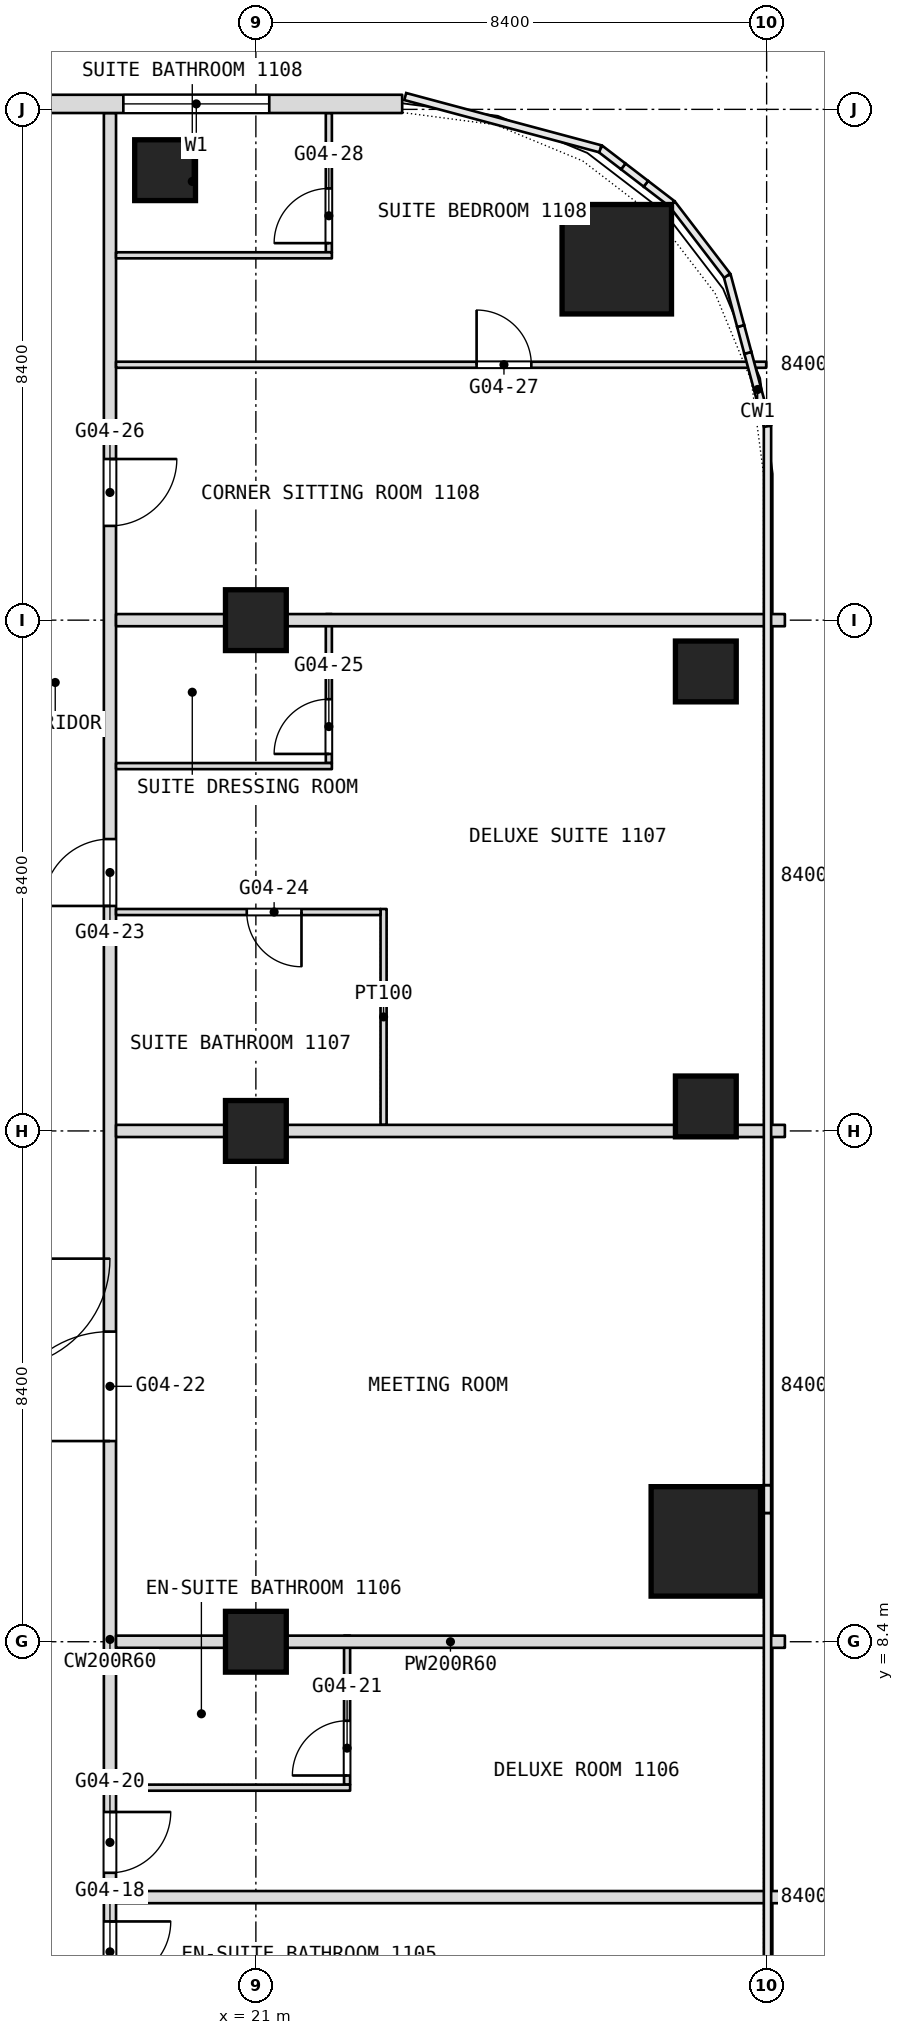
"""IFC4 building model, lengths in metres.
Left out: names, types, materials, properties, quantities, classifications, styles, units other than length and angle.
Written with IfcOpenShell. Run it as: python <this file> out.ifc"""

import sys

from ifc_helpers import new_model, si_unit, direction, frame, frame_2d, origin, origin_2d, place, context, subcontext, project, spatial, rectangle, extrude, element, fill, save


model = new_model("IFC4")
c1 = context("Model", 3, precision=1e-05, world=origin(), true_north=direction((0.0, 1.0)))
c2 = subcontext(c1, "Body", "Model", "MODEL_VIEW")
j1 = project(units=[si_unit("LENGTHUNIT", "METRE"), si_unit("PLANEANGLEUNIT", "RADIAN")], contexts=[c1])
p1 = place(None, origin())
s1 = spatial("IfcSite", under=j1, at=p1, CompositionType="ELEMENT")
p2 = place(p1, origin())
s2 = spatial("IfcBuilding", under=s1, at=p2, CompositionType="ELEMENT")
p3 = place(p2, frame((0.0, 0.0, 54.5)))
s3 = spatial("IfcBuildingStorey", under=s2, at=p3, CompositionType="ELEMENT", Elevation=54.5)
for number, where, z_axis, x_axis in (
    (1, (28.4, 10.05, 0.0), (0.0, 0.0, 1.0), (1.0, 0.0, 0.0)),
    (2, (26.936, 31.135, 0.0), (0.0, 0.0, 1.0), (1.0, 0.0, 0.0)),
):
    element("IfcColumn", number, at=place(p3, frame(where, z_axis=z_axis, x_axis=x_axis)), inside=s3, PredefinedType="COLUMN", context=c2, shape_type="SweptSolid", body=[
        extrude(rectangle(XDim=1.8, YDim=1.8, at=origin_2d()), origin(), (0.0, 0.0, 1.0), 3.6),
    ])
for number, where, z_axis, x_axis in (
    (3, (21.0, 8.4, 0.0), (0.0, 0.0, 1.0), (1.0, 0.0, 0.0)),
    (4, (21.0, 16.8, 0.0), (0.0, 0.0, 1.0), (1.0, 0.0, 0.0)),
    (5, (21.0, 25.2, 0.0), (0.0, 0.0, 1.0), (1.0, 0.0, 0.0)),
    (6, (19.507, 32.6, 0.0), (0.0, 0.0, 1.0), (1.0, 0.0, 0.0)),
    (7, (28.4, 24.356, 0.0), (0.0, 0.0, 1.0), (1.0, 0.0, 0.0)),
    (8, (28.4, 17.203, 0.0), (0.0, 0.0, 1.0), (1.0, 0.0, 0.0)),
):
    element("IfcColumn", number, at=place(p3, frame(where, z_axis=z_axis, x_axis=x_axis)), inside=s3, PredefinedType="COLUMN", context=c2, shape_type="SweptSolid", body=[
        extrude(rectangle(XDim=1.0, YDim=1.0, at=origin_2d()), origin(), (0.0, 0.0, 1.0), 3.6),
    ])
p4 = place(p3, frame((23.1, 16.9, 0.0), z_axis=(0.0, 0.0, 1.0), x_axis=(0.0, 1.0, 0.0)))
e9 = element("IfcWall", 9, at=p4, inside=s3, PredefinedType="PARTITIONING", context=c2, shape_type="SweptSolid", body=[
    extrude(rectangle(XDim=3.55, YDim=0.1, at=frame_2d((1.775, 0.0))), origin(), (0.0, 0.0, 1.0), 3.34),
])
p5 = place(p3, frame((22.5, 6.05, 0.0), z_axis=(0.0, 0.0, 1.0), x_axis=(0.0, 1.0, 0.0)))
e10 = element("IfcWall", 10, at=p5, inside=s3, PredefinedType="PARTITIONING", context=c2, shape_type="SweptSolid", body=[
    extrude(rectangle(XDim=2.45, YDim=0.1, at=frame_2d((1.225, 0.0))), origin(), (0.0, 0.0, 1.0), 3.34),
])
p6 = place(p5, frame((0.15, 0.0, 0.0)))
e11 = element("IfcOpeningElement", 11, at=p6, cuts=e10, PredefinedType="OPENING", context=c2, shape_type="SweptSolid", body=[
    extrude(rectangle(XDim=0.9, YDim=2.1, at=frame_2d((0.45, 1.05))), frame((0.0, 0.05, 0.0), z_axis=(0.0, -1.0, 0.0), x_axis=(1.0, 0.0, 0.0)), (0.0, 0.0, 1.0), 0.1),
])
p7 = place(p3, frame((22.2, 22.85, 0.0), z_axis=(0.0, 0.0, 1.0), x_axis=(0.0, 1.0, 0.0)))
e12 = element("IfcWall", 12, at=p7, inside=s3, PredefinedType="PARTITIONING", context=c2, shape_type="SweptSolid", body=[
    extrude(rectangle(XDim=2.45, YDim=0.1, at=frame_2d((1.225, 0.0))), origin(), (0.0, 0.0, 1.0), 3.34),
])
p8 = place(p7, frame((0.15, 0.0, 0.0)))
e13 = element("IfcOpeningElement", 13, at=p8, cuts=e12, PredefinedType="OPENING", context=c2, shape_type="SweptSolid", body=[
    extrude(rectangle(XDim=0.9, YDim=2.1, at=frame_2d((0.45, 1.05))), frame((0.0, 0.05, 0.0), z_axis=(0.0, -1.0, 0.0), x_axis=(1.0, 0.0, 0.0)), (0.0, 0.0, 1.0), 0.1),
])
p9 = place(p3, frame((22.2, 31.25, 0.0), z_axis=(0.0, 0.0, 1.0), x_axis=(0.0, 1.0, 0.0)))
e14 = element("IfcWall", 14, at=p9, inside=s3, PredefinedType="PARTITIONING", context=c2, shape_type="SweptSolid", body=[
    extrude(rectangle(XDim=2.29, YDim=0.1, at=frame_2d((1.145, 0.0))), origin(), (0.0, 0.0, 1.0), 3.34),
])
p10 = place(p9, frame((0.15, 0.0, 0.0)))
e15 = element("IfcOpeningElement", 15, at=p10, cuts=e14, PredefinedType="OPENING", context=c2, shape_type="SweptSolid", body=[
    extrude(rectangle(XDim=0.9, YDim=2.1, at=frame_2d((0.45, 1.05))), frame((0.0, 0.05, 0.0), z_axis=(0.0, -1.0, 0.0), x_axis=(1.0, 0.0, 0.0)), (0.0, 0.0, 1.0), 0.1),
])
p11 = place(p3, frame((18.6, -16.665, 0.0), z_axis=(0.0, 0.0, 1.0), x_axis=(0.0, 1.0, 0.0)))
e16 = element("IfcWall", 16, at=p11, inside=s3, PredefinedType="PARTITIONING", context=c2, shape_type="SweptSolid", body=[
    extrude(rectangle(XDim=50.205, YDim=0.2, at=frame_2d((25.103, 0.0))), origin(), (0.0, 0.0, 1.0), 3.34),
])
p12 = place(p11, frame((2.991, 0.0, 0.0)))
e17 = element("IfcOpeningElement", 17, at=p12, cuts=e16, PredefinedType="OPENING", context=c2, shape_type="SweptSolid", body=[
    extrude(rectangle(XDim=1.0, YDim=2.1, at=frame_2d((0.5, 1.05))), frame((0.0, 0.1, 0.0), z_axis=(0.0, -1.0, 0.0), x_axis=(1.0, 0.0, 0.0)), (0.0, 0.0, 1.0), 0.2),
])
p13 = place(p11, frame((4.574, 0.0, 0.0)))
e18 = element("IfcOpeningElement", 18, at=p13, cuts=e16, PredefinedType="OPENING", context=c2, shape_type="SweptSolid", body=[
    extrude(rectangle(XDim=1.0, YDim=2.1, at=frame_2d((0.5, 1.05))), frame((0.0, 0.1, 0.0), z_axis=(0.0, -1.0, 0.0), x_axis=(1.0, 0.0, 0.0)), (0.0, 0.0, 1.0), 0.2),
])
p14 = place(p11, frame((8.665, 0.0, 0.0)))
e19 = element("IfcOpeningElement", 19, at=p14, cuts=e16, PredefinedType="OPENING", context=c2, shape_type="SweptSolid", body=[
    extrude(rectangle(XDim=1.0, YDim=2.1, at=frame_2d((0.5, 1.05))), frame((0.0, 0.1, 0.0), z_axis=(0.0, -1.0, 0.0), x_axis=(1.0, 0.0, 0.0)), (0.0, 0.0, 1.0), 0.2),
])
p15 = place(p11, frame((15.265, 0.0, 0.0)))
e20 = element("IfcOpeningElement", 20, at=p15, cuts=e16, PredefinedType="OPENING", context=c2, shape_type="SweptSolid", body=[
    extrude(rectangle(XDim=1.0, YDim=2.1, at=frame_2d((0.5, 1.05))), frame((0.0, 0.1, 0.0), z_axis=(0.0, -1.0, 0.0), x_axis=(1.0, 0.0, 0.0)), (0.0, 0.0, 1.0), 0.2),
])
p16 = place(p11, frame((19.465, 0.0, 0.0)))
e21 = element("IfcOpeningElement", 21, at=p16, cuts=e16, PredefinedType="OPENING", context=c2, shape_type="SweptSolid", body=[
    extrude(rectangle(XDim=1.0, YDim=2.1, at=frame_2d((0.5, 1.05))), frame((0.0, 0.1, 0.0), z_axis=(0.0, -1.0, 0.0), x_axis=(1.0, 0.0, 0.0)), (0.0, 0.0, 1.0), 0.2),
])
p17 = place(p11, frame((21.265, 0.0, 0.0)))
e22 = element("IfcOpeningElement", 22, at=p17, cuts=e16, PredefinedType="OPENING", context=c2, shape_type="SweptSolid", body=[
    extrude(rectangle(XDim=1.0, YDim=2.1, at=frame_2d((0.5, 1.05))), frame((0.0, 0.1, 0.0), z_axis=(0.0, -1.0, 0.0), x_axis=(1.0, 0.0, 0.0)), (0.0, 0.0, 1.0), 0.2),
])
p18 = place(p11, frame((28.365, 0.0, 0.0)))
e23 = element("IfcOpeningElement", 23, at=p18, cuts=e16, PredefinedType="OPENING", context=c2, shape_type="SweptSolid", body=[
    extrude(rectangle(XDim=1.8, YDim=2.1, at=frame_2d((0.9, 1.05))), frame((0.0, 0.1, 0.0), z_axis=(0.0, -1.0, 0.0), x_axis=(1.0, 0.0, 0.0)), (0.0, 0.0, 1.0), 0.2),
])
p19 = place(p11, frame((37.165, 0.0, 0.0)))
e24 = element("IfcOpeningElement", 24, at=p19, cuts=e16, PredefinedType="OPENING", context=c2, shape_type="SweptSolid", body=[
    extrude(rectangle(XDim=1.1, YDim=2.1, at=frame_2d((0.55, 1.05))), frame((0.0, 0.1, 0.0), z_axis=(0.0, -1.0, 0.0), x_axis=(1.0, 0.0, 0.0)), (0.0, 0.0, 1.0), 0.2),
])
p20 = place(p11, frame((43.415, 0.0, 0.0)))
e25 = element("IfcOpeningElement", 25, at=p20, cuts=e16, PredefinedType="OPENING", context=c2, shape_type="SweptSolid", body=[
    extrude(rectangle(XDim=1.1, YDim=2.1, at=frame_2d((0.55, 1.05))), frame((0.0, 0.1, 0.0), z_axis=(0.0, -1.0, 0.0), x_axis=(1.0, 0.0, 0.0)), (0.0, 0.0, 1.0), 0.2),
])
p21 = place(p3, frame((18.7, 4.2, 0.0), z_axis=(0.0, 0.0, 1.0), x_axis=(1.0, 0.0, 0.0)))
e26 = element("IfcWall", 26, at=p21, inside=s3, PredefinedType="PARTITIONING", context=c2, shape_type="SweptSolid", body=[
    extrude(rectangle(XDim=11.0, YDim=0.2, at=frame_2d((5.5, 0.0))), origin(), (0.0, 0.0, 1.0), 3.34),
])
p22 = place(p3, frame((18.7, 6.0, 0.0), z_axis=(0.0, 0.0, 1.0), x_axis=(1.0, 0.0, 0.0)))
e27 = element("IfcWall", 27, at=p22, inside=s3, PredefinedType="PARTITIONING", context=c2, shape_type="SweptSolid", body=[
    extrude(rectangle(XDim=3.85, YDim=0.1, at=frame_2d((1.925, 0.0))), origin(), (0.0, 0.0, 1.0), 3.34),
])
for number, where, z_axis, x_axis in (
    (28, (18.7, 8.4, 0.0), (0.0, 0.0, 1.0), (1.0, 0.0, 0.0)),
    (29, (18.7, 16.8, 0.0), (0.0, 0.0, 1.0), (1.0, 0.0, 0.0)),
):
    element("IfcWall", number, at=place(p3, frame(where, z_axis=z_axis, x_axis=x_axis)), inside=s3, PredefinedType="PARTITIONING", context=c2, shape_type="SweptSolid", body=[
        extrude(rectangle(XDim=11.0, YDim=0.2, at=frame_2d((5.5, 0.0))), origin(), (0.0, 0.0, 1.0), 2.84),
    ])
p23 = place(p3, frame((18.7, 20.4, 0.0), z_axis=(0.0, 0.0, 1.0), x_axis=(1.0, 0.0, 0.0)))
e30 = element("IfcWall", 30, at=p23, inside=s3, PredefinedType="PARTITIONING", context=c2, shape_type="SweptSolid", body=[
    extrude(rectangle(XDim=4.35, YDim=0.1, at=frame_2d((2.175, 0.0))), origin(), (0.0, 0.0, 1.0), 3.34),
])
p24 = place(p23, frame((2.15, 0.0, 0.0)))
e31 = element("IfcOpeningElement", 31, at=p24, cuts=e30, PredefinedType="OPENING", context=c2, shape_type="SweptSolid", body=[
    extrude(rectangle(XDim=0.9, YDim=2.1, at=frame_2d((0.45, 1.05))), frame((0.0, 0.05, 0.0), z_axis=(0.0, -1.0, 0.0), x_axis=(1.0, 0.0, 0.0)), (0.0, 0.0, 1.0), 0.1),
])
p25 = place(p3, frame((18.7, 22.8, 0.0), z_axis=(0.0, 0.0, 1.0), x_axis=(1.0, 0.0, 0.0)))
e32 = element("IfcWall", 32, at=p25, inside=s3, PredefinedType="PARTITIONING", context=c2, shape_type="SweptSolid", body=[
    extrude(rectangle(XDim=3.55, YDim=0.1, at=frame_2d((1.775, 0.0))), origin(), (0.0, 0.0, 1.0), 3.34),
])
p26 = place(p3, frame((18.7, 25.2, 0.0), z_axis=(0.0, 0.0, 1.0), x_axis=(1.0, 0.0, 0.0)))
e33 = element("IfcWall", 33, at=p26, inside=s3, PredefinedType="PARTITIONING", context=c2, shape_type="SweptSolid", body=[
    extrude(rectangle(XDim=11.0, YDim=0.2, at=frame_2d((5.5, 0.0))), origin(), (0.0, 0.0, 1.0), 2.84),
])
p27 = place(p3, frame((18.7, 29.4, 0.0), z_axis=(0.0, 0.0, 1.0), x_axis=(1.0, 0.0, 0.0)))
e34 = element("IfcWall", 34, at=p27, inside=s3, PredefinedType="PARTITIONING", context=c2, shape_type="SweptSolid", body=[
    extrude(rectangle(XDim=10.693, YDim=0.1, at=frame_2d((5.347, 0.0))), origin(), (0.0, 0.0, 1.0), 3.34),
])
p28 = place(p27, frame((5.93, 0.0, 0.0)))
e35 = element("IfcOpeningElement", 35, at=p28, cuts=e34, PredefinedType="OPENING", context=c2, shape_type="SweptSolid", body=[
    extrude(rectangle(XDim=0.9, YDim=2.1, at=frame_2d((0.45, 1.05))), frame((0.0, 0.05, 0.0), z_axis=(0.0, -1.0, 0.0), x_axis=(1.0, 0.0, 0.0)), (0.0, 0.0, 1.0), 0.1),
])
p29 = place(p3, frame((18.7, 31.2, 0.0), z_axis=(0.0, 0.0, 1.0), x_axis=(1.0, 0.0, 0.0)))
e36 = element("IfcWall", 36, at=p29, inside=s3, PredefinedType="PARTITIONING", context=c2, shape_type="SweptSolid", body=[
    extrude(rectangle(XDim=3.55, YDim=0.1, at=frame_2d((1.775, 0.0))), origin(), (0.0, 0.0, 1.0), 3.34),
])
p30 = place(p3, frame((23.406, 33.69, 0.0), z_axis=(0.0, 0.0, 1.0), x_axis=(-1.0, 0.0, 0.0)))
e37 = element("IfcWall", 37, at=p30, inside=s3, PredefinedType="NOTDEFINED", context=c2, shape_type="SweptSolid", body=[
    extrude(rectangle(XDim=46.812, YDim=0.3, at=frame_2d((23.406, 0.0))), origin(), (0.0, 0.0, 1.0), 3.6),
])
p31 = place(p30, frame((2.186, 0.0, 0.9)))
e38 = element("IfcOpeningElement", 38, at=p31, cuts=e37, PredefinedType="OPENING", context=c2, shape_type="SweptSolid", body=[
    extrude(rectangle(XDim=2.4, YDim=2.1, at=frame_2d((1.2, 1.05))), frame((0.0, 0.15, 0.0), z_axis=(0.0, -1.0, 0.0), x_axis=(1.0, 0.0, 0.0)), (0.0, 0.0, 1.0), 0.3),
])
p32 = place(p30, frame((7.506, 0.0, 0.9)))
e39 = element("IfcOpeningElement", 39, at=p32, cuts=e37, PredefinedType="OPENING", context=c2, shape_type="SweptSolid", body=[
    extrude(rectangle(XDim=2.4, YDim=2.1, at=frame_2d((1.2, 1.05))), frame((0.0, 0.15, 0.0), z_axis=(0.0, -1.0, 0.0), x_axis=(1.0, 0.0, 0.0)), (0.0, 0.0, 1.0), 0.3),
])
p33 = place(p30, frame((11.706, 0.0, 0.9)))
e40 = element("IfcOpeningElement", 40, at=p33, cuts=e37, PredefinedType="OPENING", context=c2, shape_type="SweptSolid", body=[
    extrude(rectangle(XDim=2.4, YDim=2.1, at=frame_2d((1.2, 1.05))), frame((0.0, 0.15, 0.0), z_axis=(0.0, -1.0, 0.0), x_axis=(1.0, 0.0, 0.0)), (0.0, 0.0, 1.0), 0.3),
])
p34 = place(p30, frame((15.906, 0.0, 0.9)))
e41 = element("IfcOpeningElement", 41, at=p34, cuts=e37, PredefinedType="OPENING", context=c2, shape_type="SweptSolid", body=[
    extrude(rectangle(XDim=2.4, YDim=2.1, at=frame_2d((1.2, 1.05))), frame((0.0, 0.15, 0.0), z_axis=(0.0, -1.0, 0.0), x_axis=(1.0, 0.0, 0.0)), (0.0, 0.0, 1.0), 0.3),
])
p35 = place(p30, frame((20.106, 0.0, 0.9)))
e42 = element("IfcOpeningElement", 42, at=p35, cuts=e37, PredefinedType="OPENING", context=c2, shape_type="SweptSolid", body=[
    extrude(rectangle(XDim=2.4, YDim=2.1, at=frame_2d((1.2, 1.05))), frame((0.0, 0.15, 0.0), z_axis=(0.0, -1.0, 0.0), x_axis=(1.0, 0.0, 0.0)), (0.0, 0.0, 1.0), 0.3),
])
p36 = place(p30, frame((24.306, 0.0, 0.9)))
e43 = element("IfcOpeningElement", 43, at=p36, cuts=e37, PredefinedType="OPENING", context=c2, shape_type="SweptSolid", body=[
    extrude(rectangle(XDim=2.4, YDim=2.1, at=frame_2d((1.2, 1.05))), frame((0.0, 0.15, 0.0), z_axis=(0.0, -1.0, 0.0), x_axis=(1.0, 0.0, 0.0)), (0.0, 0.0, 1.0), 0.3),
])
p37 = place(p30, frame((28.506, 0.0, 0.9)))
e44 = element("IfcOpeningElement", 44, at=p37, cuts=e37, PredefinedType="OPENING", context=c2, shape_type="SweptSolid", body=[
    extrude(rectangle(XDim=2.4, YDim=2.1, at=frame_2d((1.2, 1.05))), frame((0.0, 0.15, 0.0), z_axis=(0.0, -1.0, 0.0), x_axis=(1.0, 0.0, 0.0)), (0.0, 0.0, 1.0), 0.3),
])
p38 = place(p30, frame((32.706, 0.0, 0.9)))
e45 = element("IfcOpeningElement", 45, at=p38, cuts=e37, PredefinedType="OPENING", context=c2, shape_type="SweptSolid", body=[
    extrude(rectangle(XDim=2.4, YDim=2.1, at=frame_2d((1.2, 1.05))), frame((0.0, 0.15, 0.0), z_axis=(0.0, -1.0, 0.0), x_axis=(1.0, 0.0, 0.0)), (0.0, 0.0, 1.0), 0.3),
])
p39 = place(p30, frame((36.906, 0.0, 0.9)))
e46 = element("IfcOpeningElement", 46, at=p39, cuts=e37, PredefinedType="OPENING", context=c2, shape_type="SweptSolid", body=[
    extrude(rectangle(XDim=2.4, YDim=2.1, at=frame_2d((1.2, 1.05))), frame((0.0, 0.15, 0.0), z_axis=(0.0, -1.0, 0.0), x_axis=(1.0, 0.0, 0.0)), (0.0, 0.0, 1.0), 0.3),
])
p40 = place(p30, frame((42.226, 0.0, 0.9)))
e47 = element("IfcOpeningElement", 47, at=p40, cuts=e37, PredefinedType="OPENING", context=c2, shape_type="SweptSolid", body=[
    extrude(rectangle(XDim=2.4, YDim=2.1, at=frame_2d((1.2, 1.05))), frame((0.0, 0.15, 0.0), z_axis=(0.0, -1.0, 0.0), x_axis=(1.0, 0.0, 0.0)), (0.0, 0.0, 1.0), 0.3),
])
p41 = place(p6, origin())
e48 = element("IfcDoor", 48, at=p41, inside=s3, OperationType="SINGLE_SWING_LEFT", PredefinedType="DOOR", context=c2, shape_type="SweptSolid", body=[
    extrude(rectangle(XDim=0.9, YDim=2.1, at=frame_2d((0.45, 1.05))), frame((0.0, 0.025, 0.0), z_axis=(0.0, -1.0, 0.0), x_axis=(1.0, 0.0, 0.0)), (0.0, 0.0, 1.0), 0.05),
])
fill(e11, e48)
p42 = place(p8, origin())
e49 = element("IfcDoor", 49, at=p42, inside=s3, OperationType="SINGLE_SWING_LEFT", PredefinedType="DOOR", context=c2, shape_type="SweptSolid", body=[
    extrude(rectangle(XDim=0.9, YDim=2.1, at=frame_2d((0.45, 1.05))), frame((0.0, 0.025, 0.0), z_axis=(0.0, -1.0, 0.0), x_axis=(1.0, 0.0, 0.0)), (0.0, 0.0, 1.0), 0.05),
])
fill(e13, e49)
p43 = place(p10, origin())
e50 = element("IfcDoor", 50, at=p43, inside=s3, OperationType="SINGLE_SWING_LEFT", PredefinedType="DOOR", context=c2, shape_type="SweptSolid", body=[
    extrude(rectangle(XDim=0.9, YDim=2.1, at=frame_2d((0.45, 1.05))), frame((0.0, 0.025, 0.0), z_axis=(0.0, -1.0, 0.0), x_axis=(1.0, 0.0, 0.0)), (0.0, 0.0, 1.0), 0.05),
])
fill(e15, e50)
p44 = place(p16, origin())
e51 = element("IfcDoor", 51, at=p44, inside=s3, OperationType="SINGLE_SWING_RIGHT", PredefinedType="DOOR", context=c2, shape_type="SweptSolid", body=[
    extrude(rectangle(XDim=1.0, YDim=2.1, at=frame_2d((0.5, 1.05))), frame((0.0, 0.025, 0.0), z_axis=(0.0, -1.0, 0.0), x_axis=(1.0, 0.0, 0.0)), (0.0, 0.0, 1.0), 0.05),
])
fill(e21, e51)
p45 = place(p17, origin())
e52 = element("IfcDoor", 52, at=p45, inside=s3, OperationType="SINGLE_SWING_RIGHT", PredefinedType="DOOR", context=c2, shape_type="SweptSolid", body=[
    extrude(rectangle(XDim=1.0, YDim=2.1, at=frame_2d((0.5, 1.05))), frame((0.0, 0.025, 0.0), z_axis=(0.0, -1.0, 0.0), x_axis=(1.0, 0.0, 0.0)), (0.0, 0.0, 1.0), 0.05),
])
fill(e22, e52)
p46 = place(p18, origin())
e53 = element("IfcDoor", 53, at=p46, inside=s3, OperationType="DOUBLE_DOOR_SINGLE_SWING", PredefinedType="DOOR", context=c2, shape_type="SweptSolid", body=[
    extrude(rectangle(XDim=1.8, YDim=2.1, at=frame_2d((0.9, 1.05))), frame((0.0, 0.025, 0.0), z_axis=(0.0, -1.0, 0.0), x_axis=(1.0, 0.0, 0.0)), (0.0, 0.0, 1.0), 0.05),
])
fill(e23, e53)
p47 = place(p19, origin())
e54 = element("IfcDoor", 54, at=p47, inside=s3, OperationType="SINGLE_SWING_RIGHT", PredefinedType="DOOR", context=c2, shape_type="SweptSolid", body=[
    extrude(rectangle(XDim=1.1, YDim=2.1, at=frame_2d((0.55, 1.05))), frame((0.0, 0.025, 0.0), z_axis=(0.0, -1.0, 0.0), x_axis=(1.0, 0.0, 0.0)), (0.0, 0.0, 1.0), 0.05),
])
fill(e24, e54)
p48 = place(p20, origin())
e55 = element("IfcDoor", 55, at=p48, inside=s3, OperationType="SINGLE_SWING_RIGHT", PredefinedType="DOOR", context=c2, shape_type="SweptSolid", body=[
    extrude(rectangle(XDim=1.1, YDim=2.1, at=frame_2d((0.55, 1.05))), frame((0.0, 0.025, 0.0), z_axis=(0.0, -1.0, 0.0), x_axis=(1.0, 0.0, 0.0)), (0.0, 0.0, 1.0), 0.05),
])
fill(e25, e55)
p49 = place(p24, origin())
e56 = element("IfcDoor", 56, at=p49, inside=s3, OperationType="SINGLE_SWING_LEFT", PredefinedType="DOOR", context=c2, shape_type="SweptSolid", body=[
    extrude(rectangle(XDim=0.9, YDim=2.1, at=frame_2d((0.45, 1.05))), frame((0.0, 0.025, 0.0), z_axis=(0.0, -1.0, 0.0), x_axis=(1.0, 0.0, 0.0)), (0.0, 0.0, 1.0), 0.05),
])
fill(e31, e56)
p50 = place(p28, origin())
e57 = element("IfcDoor", 57, at=p50, inside=s3, OperationType="SINGLE_SWING_RIGHT", PredefinedType="DOOR", context=c2, shape_type="SweptSolid", body=[
    extrude(rectangle(XDim=0.9, YDim=2.1, at=frame_2d((0.45, 1.05))), frame((0.0, 0.025, 0.0), z_axis=(0.0, -1.0, 0.0), x_axis=(1.0, 0.0, 0.0)), (0.0, 0.0, 1.0), 0.05),
])
fill(e35, e57)
p51 = place(p31, origin())
e58 = element("IfcWindow", 58, at=p51, inside=s3, PartitioningType="SINGLE_PANEL", PredefinedType="WINDOW", context=c2, shape_type="SweptSolid", body=[
    extrude(rectangle(XDim=2.4, YDim=2.1, at=frame_2d((1.2, 1.05))), frame((0.0, 0.03, 0.0), z_axis=(0.0, -1.0, 0.0), x_axis=(1.0, 0.0, 0.0)), (0.0, 0.0, 1.0), 0.06),
])
fill(e38, e58)
save(model, sys.argv[1])
